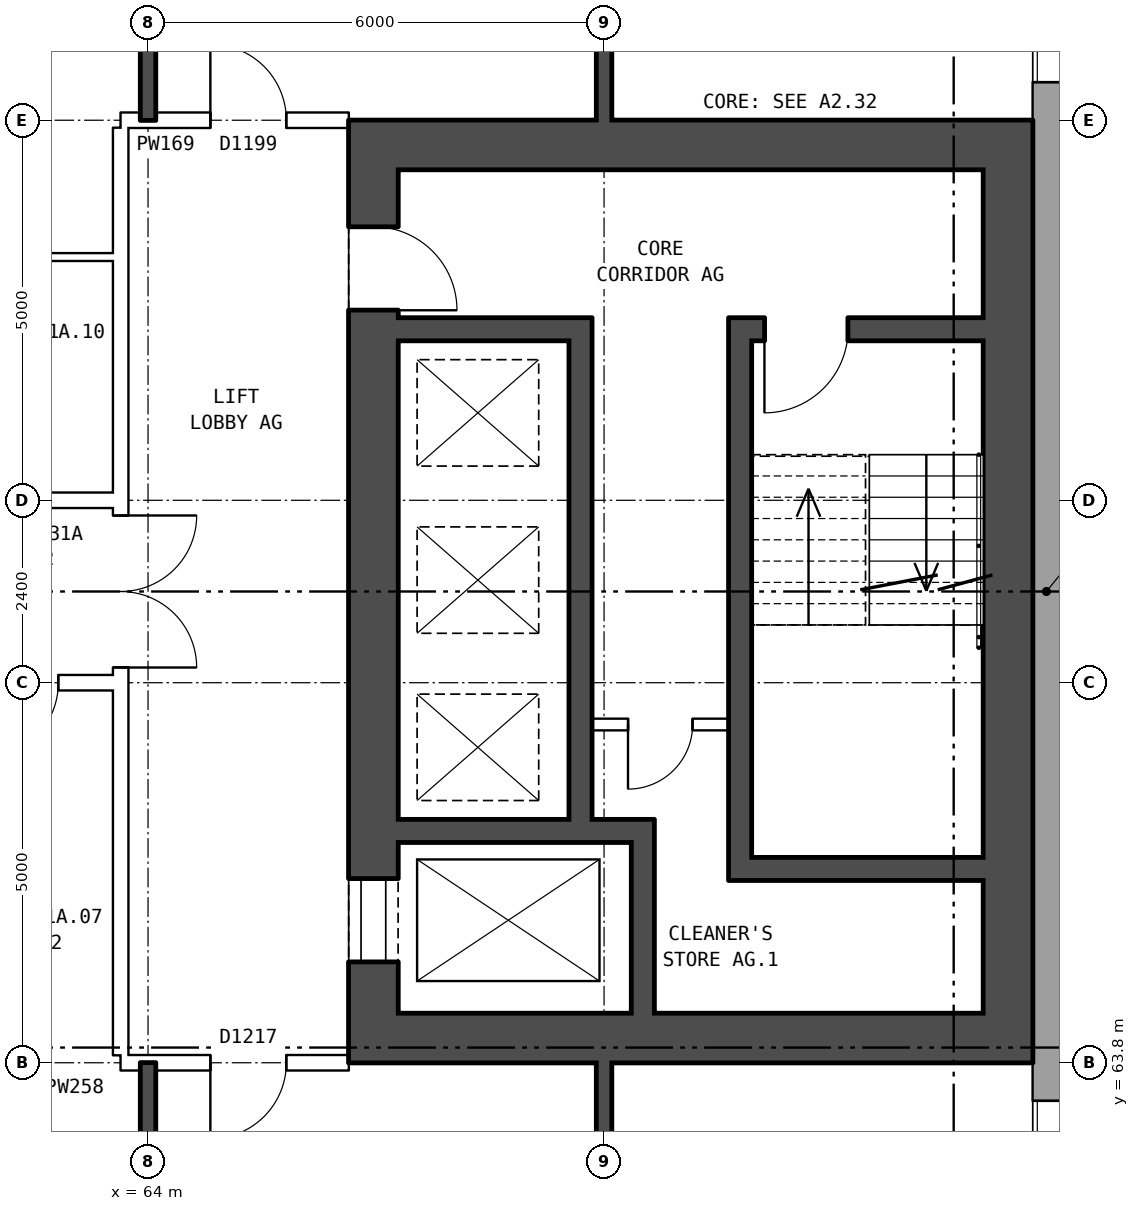
"""IFC4 building model, lengths in metres.
Left out: names, types, materials, properties, quantities, classifications, styles, units other than length and angle.
Written with IfcOpenShell. Run it as: python <this file> out.ifc"""

import sys

from ifc_helpers import new_model, si_unit, direction, frame, frame_2d, origin, place, context, subcontext, project, spatial, rectangle, extrude, element, fill, save


model = new_model("IFC4")
c1 = context("Model", 3, precision=1e-05, world=origin(), true_north=direction((0.0, 1.0)))
c2 = subcontext(c1, "Body", "Model", "MODEL_VIEW")
j1 = project(units=[si_unit("LENGTHUNIT", "METRE"), si_unit("PLANEANGLEUNIT", "RADIAN")], contexts=[c1])
p1 = place(None, origin())
s1 = spatial("IfcSite", under=j1, at=p1, CompositionType="ELEMENT")
p2 = place(p1, origin())
s2 = spatial("IfcBuilding", under=s1, at=p2, CompositionType="ELEMENT")
p3 = place(p2, frame((0.0, 0.0, 111.9)))
s3 = spatial("IfcBuildingStorey", under=s2, at=p3, CompositionType="ELEMENT", Elevation=111.9)
p4 = place(p3, frame((75.82, 57.075, 0.0), z_axis=(0.0, 0.0, 1.0), x_axis=(0.0, 1.0, 0.0)))
e1 = element("IfcWall", 1, at=p4, inside=s3, PredefinedType="STANDARD", context=c2, shape_type="SweptSolid", body=[
    extrude(rectangle(XDim=25.851, YDim=0.36, at=frame_2d((12.925, 0.0))), origin(), (0.0, 0.0, 1.0), 2.85),
])
p5 = place(p4, frame((1.625, 0.0, 0.8)))
e2 = element("IfcOpeningElement", 2, at=p5, cuts=e1, PredefinedType="OPENING", context=c2, shape_type="SweptSolid", body=[
    extrude(rectangle(XDim=1.6, YDim=1.8, at=frame_2d((0.8, 0.9))), frame((0.0, 0.19, 0.0), z_axis=(0.0, -1.0, 0.0), x_axis=(1.0, 0.0, 0.0)), (0.0, 0.0, 1.0), 0.38),
])
p6 = place(p4, frame((4.625, 0.0, 0.8)))
e3 = element("IfcOpeningElement", 3, at=p6, cuts=e1, PredefinedType="OPENING", context=c2, shape_type="SweptSolid", body=[
    extrude(rectangle(XDim=1.6, YDim=1.8, at=frame_2d((0.8, 0.9))), frame((0.0, 0.19, 0.0), z_axis=(0.0, -1.0, 0.0), x_axis=(1.0, 0.0, 0.0)), (0.0, 0.0, 1.0), 0.38),
])
p7 = place(p4, frame((19.625, 0.0, 0.8)))
e4 = element("IfcOpeningElement", 4, at=p7, cuts=e1, PredefinedType="OPENING", context=c2, shape_type="SweptSolid", body=[
    extrude(rectangle(XDim=1.6, YDim=1.8, at=frame_2d((0.8, 0.9))), frame((0.0, 0.19, 0.0), z_axis=(0.0, -1.0, 0.0), x_axis=(1.0, 0.0, 0.0)), (0.0, 0.0, 1.0), 0.38),
])
p8 = place(p4, frame((22.625, 0.0, 0.8)))
e5 = element("IfcOpeningElement", 5, at=p8, cuts=e1, PredefinedType="OPENING", context=c2, shape_type="SweptSolid", body=[
    extrude(rectangle(XDim=1.6, YDim=1.8, at=frame_2d((0.8, 0.9))), frame((0.0, 0.19, 0.0), z_axis=(0.0, -1.0, 0.0), x_axis=(1.0, 0.0, 0.0)), (0.0, 0.0, 1.0), 0.38),
])
p9 = place(p3, frame((66.965, 64.45, 0.0), z_axis=(0.0, 0.0, 1.0), x_axis=(0.0, 1.0, 0.0)))
e6 = element("IfcWall", 6, at=p9, inside=s3, PredefinedType="SHEAR", context=c2, shape_type="SweptSolid", body=[
    extrude(rectangle(XDim=11.1, YDim=0.65, at=frame_2d((5.55, 0.0))), origin(), (0.0, 0.0, 1.0), 2.85),
])
p10 = place(p9, frame((0.675, 0.0, 0.0)))
e7 = element("IfcOpeningElement", 7, at=p10, cuts=e6, PredefinedType="OPENING", context=c2, shape_type="SweptSolid", body=[
    extrude(rectangle(XDim=1.1, YDim=2.1, at=frame_2d((0.55, 1.05))), frame((0.0, 0.335, 0.0), z_axis=(0.0, -1.0, 0.0), x_axis=(1.0, 0.0, 0.0)), (0.0, 0.0, 1.0), 0.67),
])
p11 = place(p9, frame((9.25, 0.0, 0.0)))
e8 = element("IfcOpeningElement", 8, at=p11, cuts=e6, PredefinedType="OPENING", context=c2, shape_type="SweptSolid", body=[
    extrude(rectangle(XDim=1.1, YDim=2.1, at=frame_2d((0.55, 1.05))), frame((0.0, 0.335, 0.0), z_axis=(0.0, -1.0, 0.0), x_axis=(1.0, 0.0, 0.0)), (0.0, 0.0, 1.0), 0.67),
])
p12 = place(p3, frame((75.315, 64.45, 0.0), z_axis=(0.0, 0.0, 1.0), x_axis=(0.0, 1.0, 0.0)))
e9 = element("IfcWall", 9, at=p12, inside=s3, PredefinedType="SHEAR", context=c2, shape_type="SweptSolid", body=[
    extrude(rectangle(XDim=11.1, YDim=0.65, at=frame_2d((5.55, 0.0))), origin(), (0.0, 0.0, 1.0), 2.85),
])
for number, where, z_axis, x_axis in (
    (10, (66.64, 64.125, 0.0), (0.0, 0.0, 1.0), (1.0, 0.0, 0.0)),
    (11, (66.64, 75.875, 0.0), (0.0, 0.0, 1.0), (1.0, 0.0, 0.0)),
):
    element("IfcWall", number, at=place(p3, frame(where, z_axis=z_axis, x_axis=x_axis)), inside=s3, PredefinedType="SHEAR", context=c2, shape_type="SweptSolid", body=[
        extrude(rectangle(XDim=9.0, YDim=0.65, at=frame_2d((4.5, 0.0))), origin(), (0.0, 0.0, 1.0), 2.85),
    ])
p13 = place(p3, frame((71.94, 66.35, 0.0), z_axis=(0.0, 0.0, 1.0), x_axis=(1.0, 0.0, 0.0)))
e12 = element("IfcWall", 12, at=p13, inside=s3, PredefinedType="SHEAR", context=c2, shape_type="SweptSolid", body=[
    extrude(rectangle(XDim=3.05, YDim=0.3, at=frame_2d((1.525, 0.0))), origin(), (0.0, 0.0, 1.0), 2.85),
])
p14 = place(p3, frame((67.29, 66.85, 0.0), z_axis=(0.0, 0.0, 1.0), x_axis=(1.0, 0.0, 0.0)))
e13 = element("IfcWall", 13, at=p14, inside=s3, PredefinedType="SHEAR", context=c2, shape_type="SweptSolid", body=[
    extrude(rectangle(XDim=3.37, YDim=0.3, at=frame_2d((1.685, 0.0))), origin(), (0.0, 0.0, 1.0), 2.85),
])
p15 = place(p3, frame((69.84, 68.25, 0.0), z_axis=(0.0, 0.0, 1.0), x_axis=(1.0, 0.0, 0.0)))
e14 = element("IfcWall", 14, at=p15, inside=s3, PredefinedType="PARTITIONING", context=c2, shape_type="SweptSolid", body=[
    extrude(rectangle(XDim=1.8, YDim=0.15, at=frame_2d((0.9, 0.0))), origin(), (0.0, 0.0, 1.0), 2.85),
])
p16 = place(p15, frame((0.475, 0.0, 0.0)))
e15 = element("IfcOpeningElement", 15, at=p16, cuts=e14, PredefinedType="OPENING", context=c2, shape_type="SweptSolid", body=[
    extrude(rectangle(XDim=0.85, YDim=2.1, at=frame_2d((0.425, 1.05))), frame((0.0, 0.085, 0.0), z_axis=(0.0, -1.0, 0.0), x_axis=(1.0, 0.0, 0.0)), (0.0, 0.0, 1.0), 0.17),
])
p17 = place(p3, frame((67.29, 73.45, 0.0), z_axis=(0.0, 0.0, 1.0), x_axis=(1.0, 0.0, 0.0)))
e16 = element("IfcWall", 16, at=p17, inside=s3, PredefinedType="SHEAR", context=c2, shape_type="SweptSolid", body=[
    extrude(rectangle(XDim=2.25, YDim=0.3, at=frame_2d((1.125, 0.0))), origin(), (0.0, 0.0, 1.0), 2.85),
])
p18 = place(p3, frame((71.94, 73.45, 0.0), z_axis=(0.0, 0.0, 1.0), x_axis=(1.0, 0.0, 0.0)))
e17 = element("IfcWall", 17, at=p18, inside=s3, PredefinedType="SHEAR", context=c2, shape_type="SweptSolid", body=[
    extrude(rectangle(XDim=3.05, YDim=0.3, at=frame_2d((1.525, 0.0))), origin(), (0.0, 0.0, 1.0), 2.85),
])
p19 = place(p18, frame((0.17, 0.0, 0.0)))
e18 = element("IfcOpeningElement", 18, at=p19, cuts=e17, PredefinedType="OPENING", context=c2, shape_type="SweptSolid", body=[
    extrude(rectangle(XDim=1.1, YDim=2.1, at=frame_2d((0.55, 1.05))), frame((0.0, 0.16, 0.0), z_axis=(0.0, -1.0, 0.0), x_axis=(1.0, 0.0, 0.0)), (0.0, 0.0, 1.0), 0.32),
])
p20 = place(p3, frame((69.69, 67.0, 0.0), z_axis=(0.0, 0.0, 1.0), x_axis=(0.0, 1.0, 0.0)))
e19 = element("IfcWall", 19, at=p20, inside=s3, PredefinedType="SHEAR", context=c2, shape_type="SweptSolid", body=[
    extrude(rectangle(XDim=6.6, YDim=0.3, at=frame_2d((3.3, 0.0))), origin(), (0.0, 0.0, 1.0), 2.85),
])
p21 = place(p3, frame((70.51, 64.45, 0.0), z_axis=(0.0, 0.0, 1.0), x_axis=(0.0, 1.0, 0.0)))
e20 = element("IfcWall", 20, at=p21, inside=s3, PredefinedType="SHEAR", context=c2, shape_type="SweptSolid", body=[
    extrude(rectangle(XDim=2.25, YDim=0.3, at=frame_2d((1.125, 0.0))), origin(), (0.0, 0.0, 1.0), 2.85),
])
p22 = place(p3, frame((71.79, 66.2, 0.0), z_axis=(0.0, 0.0, 1.0), x_axis=(0.0, 1.0, 0.0)))
e21 = element("IfcWall", 21, at=p22, inside=s3, PredefinedType="SHEAR", context=c2, shape_type="SweptSolid", body=[
    extrude(rectangle(XDim=7.4, YDim=0.3, at=frame_2d((3.7, 0.0))), origin(), (0.0, 0.0, 1.0), 2.85),
])
p23 = place(p3, frame((63.64, 63.9, 0.0), z_axis=(0.0, 0.0, 1.0), x_axis=(0.0, 1.0, 0.0)))
e22 = element("IfcWall", 22, at=p23, inside=s3, PredefinedType="PARTITIONING", context=c2, shape_type="SweptSolid", body=[
    extrude(rectangle(XDim=12.2, YDim=0.2, at=frame_2d((6.1, 0.0))), origin(), (0.0, 0.0, 1.0), 2.85),
])
p24 = place(p23, frame((5.1, 0.0, 0.0)))
e23 = element("IfcOpeningElement", 23, at=p24, cuts=e22, PredefinedType="OPENING", context=c2, shape_type="SweptSolid", body=[
    extrude(rectangle(XDim=2.0, YDim=2.1, at=frame_2d((1.0, 1.05))), frame((0.0, 0.11, 0.0), z_axis=(0.0, -1.0, 0.0), x_axis=(1.0, 0.0, 0.0)), (0.0, 0.0, 1.0), 0.22),
])
p25 = place(p3, frame((63.64, 63.8, 0.0), z_axis=(0.0, 0.0, 1.0), x_axis=(1.0, 0.0, 0.0)))
e24 = element("IfcWall", 24, at=p25, inside=s3, PredefinedType="PARTITIONING", context=c2, shape_type="SweptSolid", body=[
    extrude(rectangle(XDim=3.0, YDim=0.2, at=frame_2d((1.5, 0.0))), origin(), (0.0, 0.0, 1.0), 2.85),
])
p26 = place(p25, frame((1.18, 0.0, 0.0)))
e25 = element("IfcOpeningElement", 25, at=p26, cuts=e24, PredefinedType="OPENING", context=c2, shape_type="SweptSolid", body=[
    extrude(rectangle(XDim=1.0, YDim=2.1, at=frame_2d((0.5, 1.05))), frame((0.0, 0.11, 0.0), z_axis=(0.0, -1.0, 0.0), x_axis=(1.0, 0.0, 0.0)), (0.0, 0.0, 1.0), 0.22),
])
p27 = place(p3, frame((44.36, 68.8, 0.0), z_axis=(0.0, 0.0, 1.0), x_axis=(1.0, 0.0, 0.0)))
e26 = element("IfcWall", 26, at=p27, inside=s3, PredefinedType="PARTITIONING", context=c2, shape_type="SweptSolid", body=[
    extrude(rectangle(XDim=19.28, YDim=0.2, at=frame_2d((9.64, 0.0))), origin(), (0.0, 0.0, 1.0), 2.85),
])
p28 = place(p27, frame((17.46, 0.0, 0.0)))
e27 = element("IfcOpeningElement", 27, at=p28, cuts=e26, PredefinedType="OPENING", context=c2, shape_type="SweptSolid", body=[
    extrude(rectangle(XDim=1.0, YDim=2.1, at=frame_2d((0.5, 1.05))), frame((0.0, 0.11, 0.0), z_axis=(0.0, -1.0, 0.0), x_axis=(1.0, 0.0, 0.0)), (0.0, 0.0, 1.0), 0.22),
])
p29 = place(p27, frame((11.64, 0.0, 0.0)))
e28 = element("IfcOpeningElement", 28, at=p29, cuts=e26, PredefinedType="OPENING", context=c2, shape_type="SweptSolid", body=[
    extrude(rectangle(XDim=1.0, YDim=2.1, at=frame_2d((0.5, 1.05))), frame((0.0, 0.11, 0.0), z_axis=(0.0, -1.0, 0.0), x_axis=(1.0, 0.0, 0.0)), (0.0, 0.0, 1.0), 0.22),
])
p30 = place(p27, frame((2.64, 0.0, 0.0)))
e29 = element("IfcOpeningElement", 29, at=p30, cuts=e26, PredefinedType="OPENING", context=c2, shape_type="SweptSolid", body=[
    extrude(rectangle(XDim=1.0, YDim=2.1, at=frame_2d((0.5, 1.05))), frame((0.0, 0.11, 0.0), z_axis=(0.0, -1.0, 0.0), x_axis=(1.0, 0.0, 0.0)), (0.0, 0.0, 1.0), 0.22),
])
p31 = place(p3, frame((44.36, 71.2, 0.0), z_axis=(0.0, 0.0, 1.0), x_axis=(1.0, 0.0, 0.0)))
e30 = element("IfcWall", 30, at=p31, inside=s3, PredefinedType="PARTITIONING", context=c2, shape_type="SweptSolid", body=[
    extrude(rectangle(XDim=19.28, YDim=0.2, at=frame_2d((9.64, 0.0))), origin(), (0.0, 0.0, 1.0), 2.85),
])
p32 = place(p31, frame((14.64, 0.0, 0.0)))
e31 = element("IfcOpeningElement", 31, at=p32, cuts=e30, PredefinedType="OPENING", context=c2, shape_type="SweptSolid", body=[
    extrude(rectangle(XDim=1.0, YDim=2.1, at=frame_2d((0.5, 1.05))), frame((0.0, 0.11, 0.0), z_axis=(0.0, -1.0, 0.0), x_axis=(1.0, 0.0, 0.0)), (0.0, 0.0, 1.0), 0.22),
])
p33 = place(p31, frame((5.64, 0.0, 0.0)))
e32 = element("IfcOpeningElement", 32, at=p33, cuts=e30, PredefinedType="OPENING", context=c2, shape_type="SweptSolid", body=[
    extrude(rectangle(XDim=1.0, YDim=2.1, at=frame_2d((0.5, 1.05))), frame((0.0, 0.11, 0.0), z_axis=(0.0, -1.0, 0.0), x_axis=(1.0, 0.0, 0.0)), (0.0, 0.0, 1.0), 0.22),
])
p34 = place(p3, frame((61.0, 74.4, 0.0), z_axis=(0.0, 0.0, 1.0), x_axis=(1.0, 0.0, 0.0)))
e33 = element("IfcWall", 33, at=p34, inside=s3, PredefinedType="PARTITIONING", context=c2, shape_type="SweptSolid", body=[
    extrude(rectangle(XDim=2.64, YDim=0.1, at=frame_2d((1.32, 0.0))), origin(), (0.0, 0.0, 1.0), 2.85),
])
p35 = place(p3, frame((63.64, 76.2, 0.0), z_axis=(0.0, 0.0, 1.0), x_axis=(1.0, 0.0, 0.0)))
e34 = element("IfcWall", 34, at=p35, inside=s3, PredefinedType="PARTITIONING", context=c2, shape_type="SweptSolid", body=[
    extrude(rectangle(XDim=3.0, YDim=0.2, at=frame_2d((1.5, 0.0))), origin(), (0.0, 0.0, 1.0), 2.85),
])
p36 = place(p35, frame((1.18, 0.0, 0.0)))
e35 = element("IfcOpeningElement", 35, at=p36, cuts=e34, PredefinedType="OPENING", context=c2, shape_type="SweptSolid", body=[
    extrude(rectangle(XDim=1.0, YDim=2.1, at=frame_2d((0.5, 1.05))), frame((0.0, 0.11, 0.0), z_axis=(0.0, -1.0, 0.0), x_axis=(1.0, 0.0, 0.0)), (0.0, 0.0, 1.0), 0.22),
])
for number, where, z_axis, x_axis in (
    (36, (64.0, 54.36, 0.0), (0.0, 0.0, 1.0), (0.0, 1.0, 0.0)),
    (37, (64.0, 76.2, 0.0), (0.0, 0.0, 1.0), (0.0, 1.0, 0.0)),
):
    element("IfcWall", number, at=place(p3, frame(where, z_axis=z_axis, x_axis=x_axis)), inside=s3, PredefinedType="SOLIDWALL", context=c2, shape_type="SweptSolid", body=[
        extrude(rectangle(XDim=9.44, YDim=0.2, at=frame_2d((4.72, 0.0))), origin(), (0.0, 0.0, 1.0), 2.85),
    ])
p37 = place(p3, frame((70.0, 54.36, 0.0), z_axis=(0.0, 0.0, 1.0), x_axis=(0.0, 1.0, 0.0)))
e38 = element("IfcWall", 38, at=p37, inside=s3, PredefinedType="SOLIDWALL", context=c2, shape_type="SweptSolid", body=[
    extrude(rectangle(XDim=9.44, YDim=0.2, at=frame_2d((4.72, 0.0))), origin(), (0.0, 0.0, 1.0), 2.85),
])
p38 = place(p37, frame((2.32, 0.0, 0.0)))
e39 = element("IfcOpeningElement", 39, at=p38, cuts=e38, PredefinedType="OPENING", context=c2, shape_type="SweptSolid", body=[
    extrude(rectangle(XDim=0.9, YDim=2.1, at=frame_2d((0.45, 1.05))), frame((0.0, 0.11, 0.0), z_axis=(0.0, -1.0, 0.0), x_axis=(1.0, 0.0, 0.0)), (0.0, 0.0, 1.0), 0.22),
])
p39 = place(p37, frame((7.59, 0.0, 0.0)))
e40 = element("IfcOpeningElement", 40, at=p39, cuts=e38, PredefinedType="OPENING", context=c2, shape_type="SweptSolid", body=[
    extrude(rectangle(XDim=0.9, YDim=2.1, at=frame_2d((0.45, 1.05))), frame((0.0, 0.11, 0.0), z_axis=(0.0, -1.0, 0.0), x_axis=(1.0, 0.0, 0.0)), (0.0, 0.0, 1.0), 0.22),
])
p40 = place(p3, frame((70.0, 76.2, 0.0), z_axis=(0.0, 0.0, 1.0), x_axis=(0.0, 1.0, 0.0)))
e41 = element("IfcWall", 41, at=p40, inside=s3, PredefinedType="SOLIDWALL", context=c2, shape_type="SweptSolid", body=[
    extrude(rectangle(XDim=9.44, YDim=0.2, at=frame_2d((4.72, 0.0))), origin(), (0.0, 0.0, 1.0), 2.85),
])
p41 = place(p40, frame((1.5, 0.0, 0.0)))
e42 = element("IfcOpeningElement", 42, at=p41, cuts=e41, PredefinedType="OPENING", context=c2, shape_type="SweptSolid", body=[
    extrude(rectangle(XDim=0.9, YDim=2.1, at=frame_2d((0.45, 1.05))), frame((0.0, 0.11, 0.0), z_axis=(0.0, -1.0, 0.0), x_axis=(1.0, 0.0, 0.0)), (0.0, 0.0, 1.0), 0.22),
])
p42 = place(p6, origin())
e43 = element("IfcWindow", 43, at=p42, inside=s3, PartitioningType="SINGLE_PANEL", PredefinedType="WINDOW", context=c2, shape_type="SweptSolid", body=[
    extrude(rectangle(XDim=1.6, YDim=1.8, at=frame_2d((0.8, 0.9))), frame((0.0, 0.15, 0.0), z_axis=(0.0, -1.0, 0.0), x_axis=(1.0, 0.0, 0.0)), (0.0, 0.0, 1.0), 0.06),
])
fill(e3, e43)
p43 = place(p7, origin())
e44 = element("IfcWindow", 44, at=p43, inside=s3, PartitioningType="SINGLE_PANEL", PredefinedType="WINDOW", context=c2, shape_type="SweptSolid", body=[
    extrude(rectangle(XDim=1.6, YDim=1.8, at=frame_2d((0.8, 0.9))), frame((0.0, 0.15, 0.0), z_axis=(0.0, -1.0, 0.0), x_axis=(1.0, 0.0, 0.0)), (0.0, 0.0, 1.0), 0.06),
])
fill(e4, e44)
p44 = place(p10, origin())
e45 = element("IfcDoor", 45, at=p44, inside=s3, OperationType="DOUBLE_DOOR_SLIDING", PredefinedType="DOOR", context=c2, shape_type="SweptSolid", body=[
    extrude(rectangle(XDim=1.1, YDim=2.1, at=frame_2d((0.55, 1.05))), frame((0.0, -0.26, 0.0), z_axis=(0.0, -1.0, 0.0), x_axis=(1.0, 0.0, 0.0)), (0.0, 0.0, 1.0), 0.05),
])
fill(e7, e45)
p45 = place(p11, frame((1.1, 0.0, 0.0), z_axis=(0.0, 0.0, 1.0), x_axis=(-1.0, 0.0, 0.0)))
e46 = element("IfcDoor", 46, at=p45, inside=s3, OperationType="SINGLE_SWING_RIGHT", PredefinedType="DOOR", context=c2, shape_type="SweptSolid", body=[
    extrude(rectangle(XDim=1.1, YDim=2.1, at=frame_2d((0.55, 1.05))), frame((0.0, 0.31, 0.0), z_axis=(0.0, -1.0, 0.0), x_axis=(1.0, 0.0, 0.0)), (0.0, 0.0, 1.0), 0.05),
])
fill(e8, e46)
p46 = place(p19, frame((1.1, 0.0, 0.0), z_axis=(0.0, 0.0, 1.0), x_axis=(-1.0, 0.0, 0.0)))
e47 = element("IfcDoor", 47, at=p46, inside=s3, OperationType="SINGLE_SWING_RIGHT", PredefinedType="DOOR", context=c2, shape_type="SweptSolid", body=[
    extrude(rectangle(XDim=1.1, YDim=2.1, at=frame_2d((0.55, 1.05))), frame((0.0, 0.025, 0.0), z_axis=(0.0, -1.0, 0.0), x_axis=(1.0, 0.0, 0.0)), (0.0, 0.0, 1.0), 0.05),
])
fill(e18, e47)
p47 = place(p16, frame((0.85, 0.0, 0.0), z_axis=(0.0, 0.0, 1.0), x_axis=(-1.0, 0.0, 0.0)))
e48 = element("IfcDoor", 48, at=p47, inside=s3, OperationType="SINGLE_SWING_RIGHT", PredefinedType="DOOR", context=c2, shape_type="SweptSolid", body=[
    extrude(rectangle(XDim=0.85, YDim=2.1, at=frame_2d((0.425, 1.05))), frame((0.0, 0.025, 0.0), z_axis=(0.0, -1.0, 0.0), x_axis=(1.0, 0.0, 0.0)), (0.0, 0.0, 1.0), 0.05),
])
fill(e15, e48)
p48 = place(p24, frame((2.0, 0.0, 0.0), z_axis=(0.0, 0.0, 1.0), x_axis=(-1.0, 0.0, 0.0)))
e49 = element("IfcDoor", 49, at=p48, inside=s3, OperationType="DOUBLE_DOOR_SINGLE_SWING", PredefinedType="DOOR", context=c2, shape_type="SweptSolid", body=[
    extrude(rectangle(XDim=2.0, YDim=2.1, at=frame_2d((1.0, 1.05))), frame((0.0, 0.025, 0.0), z_axis=(0.0, -1.0, 0.0), x_axis=(1.0, 0.0, 0.0)), (0.0, 0.0, 1.0), 0.05),
])
fill(e23, e49)
p49 = place(p26, frame((1.0, 0.0, 0.0), z_axis=(0.0, 0.0, 1.0), x_axis=(-1.0, 0.0, 0.0)))
e50 = element("IfcDoor", 50, at=p49, inside=s3, OperationType="SINGLE_SWING_RIGHT", PredefinedType="DOOR", context=c2, shape_type="SweptSolid", body=[
    extrude(rectangle(XDim=1.0, YDim=2.1, at=frame_2d((0.5, 1.05))), frame((0.0, 0.025, 0.0), z_axis=(0.0, -1.0, 0.0), x_axis=(1.0, 0.0, 0.0)), (0.0, 0.0, 1.0), 0.05),
])
fill(e25, e50)
p50 = place(p36, origin())
e51 = element("IfcDoor", 51, at=p50, inside=s3, OperationType="SINGLE_SWING_LEFT", PredefinedType="DOOR", context=c2, shape_type="SweptSolid", body=[
    extrude(rectangle(XDim=1.0, YDim=2.1, at=frame_2d((0.5, 1.05))), frame((0.0, 0.025, 0.0), z_axis=(0.0, -1.0, 0.0), x_axis=(1.0, 0.0, 0.0)), (0.0, 0.0, 1.0), 0.05),
])
fill(e35, e51)
p51 = place(p28, frame((1.0, 0.0, 0.0), z_axis=(0.0, 0.0, 1.0), x_axis=(-1.0, 0.0, 0.0)))
e52 = element("IfcDoor", 52, at=p51, inside=s3, OperationType="SINGLE_SWING_RIGHT", PredefinedType="DOOR", context=c2, shape_type="SweptSolid", body=[
    extrude(rectangle(XDim=1.0, YDim=2.1, at=frame_2d((0.5, 1.05))), frame((0.0, 0.025, 0.0), z_axis=(0.0, -1.0, 0.0), x_axis=(1.0, 0.0, 0.0)), (0.0, 0.0, 1.0), 0.05),
])
fill(e27, e52)
save(model, sys.argv[1])
